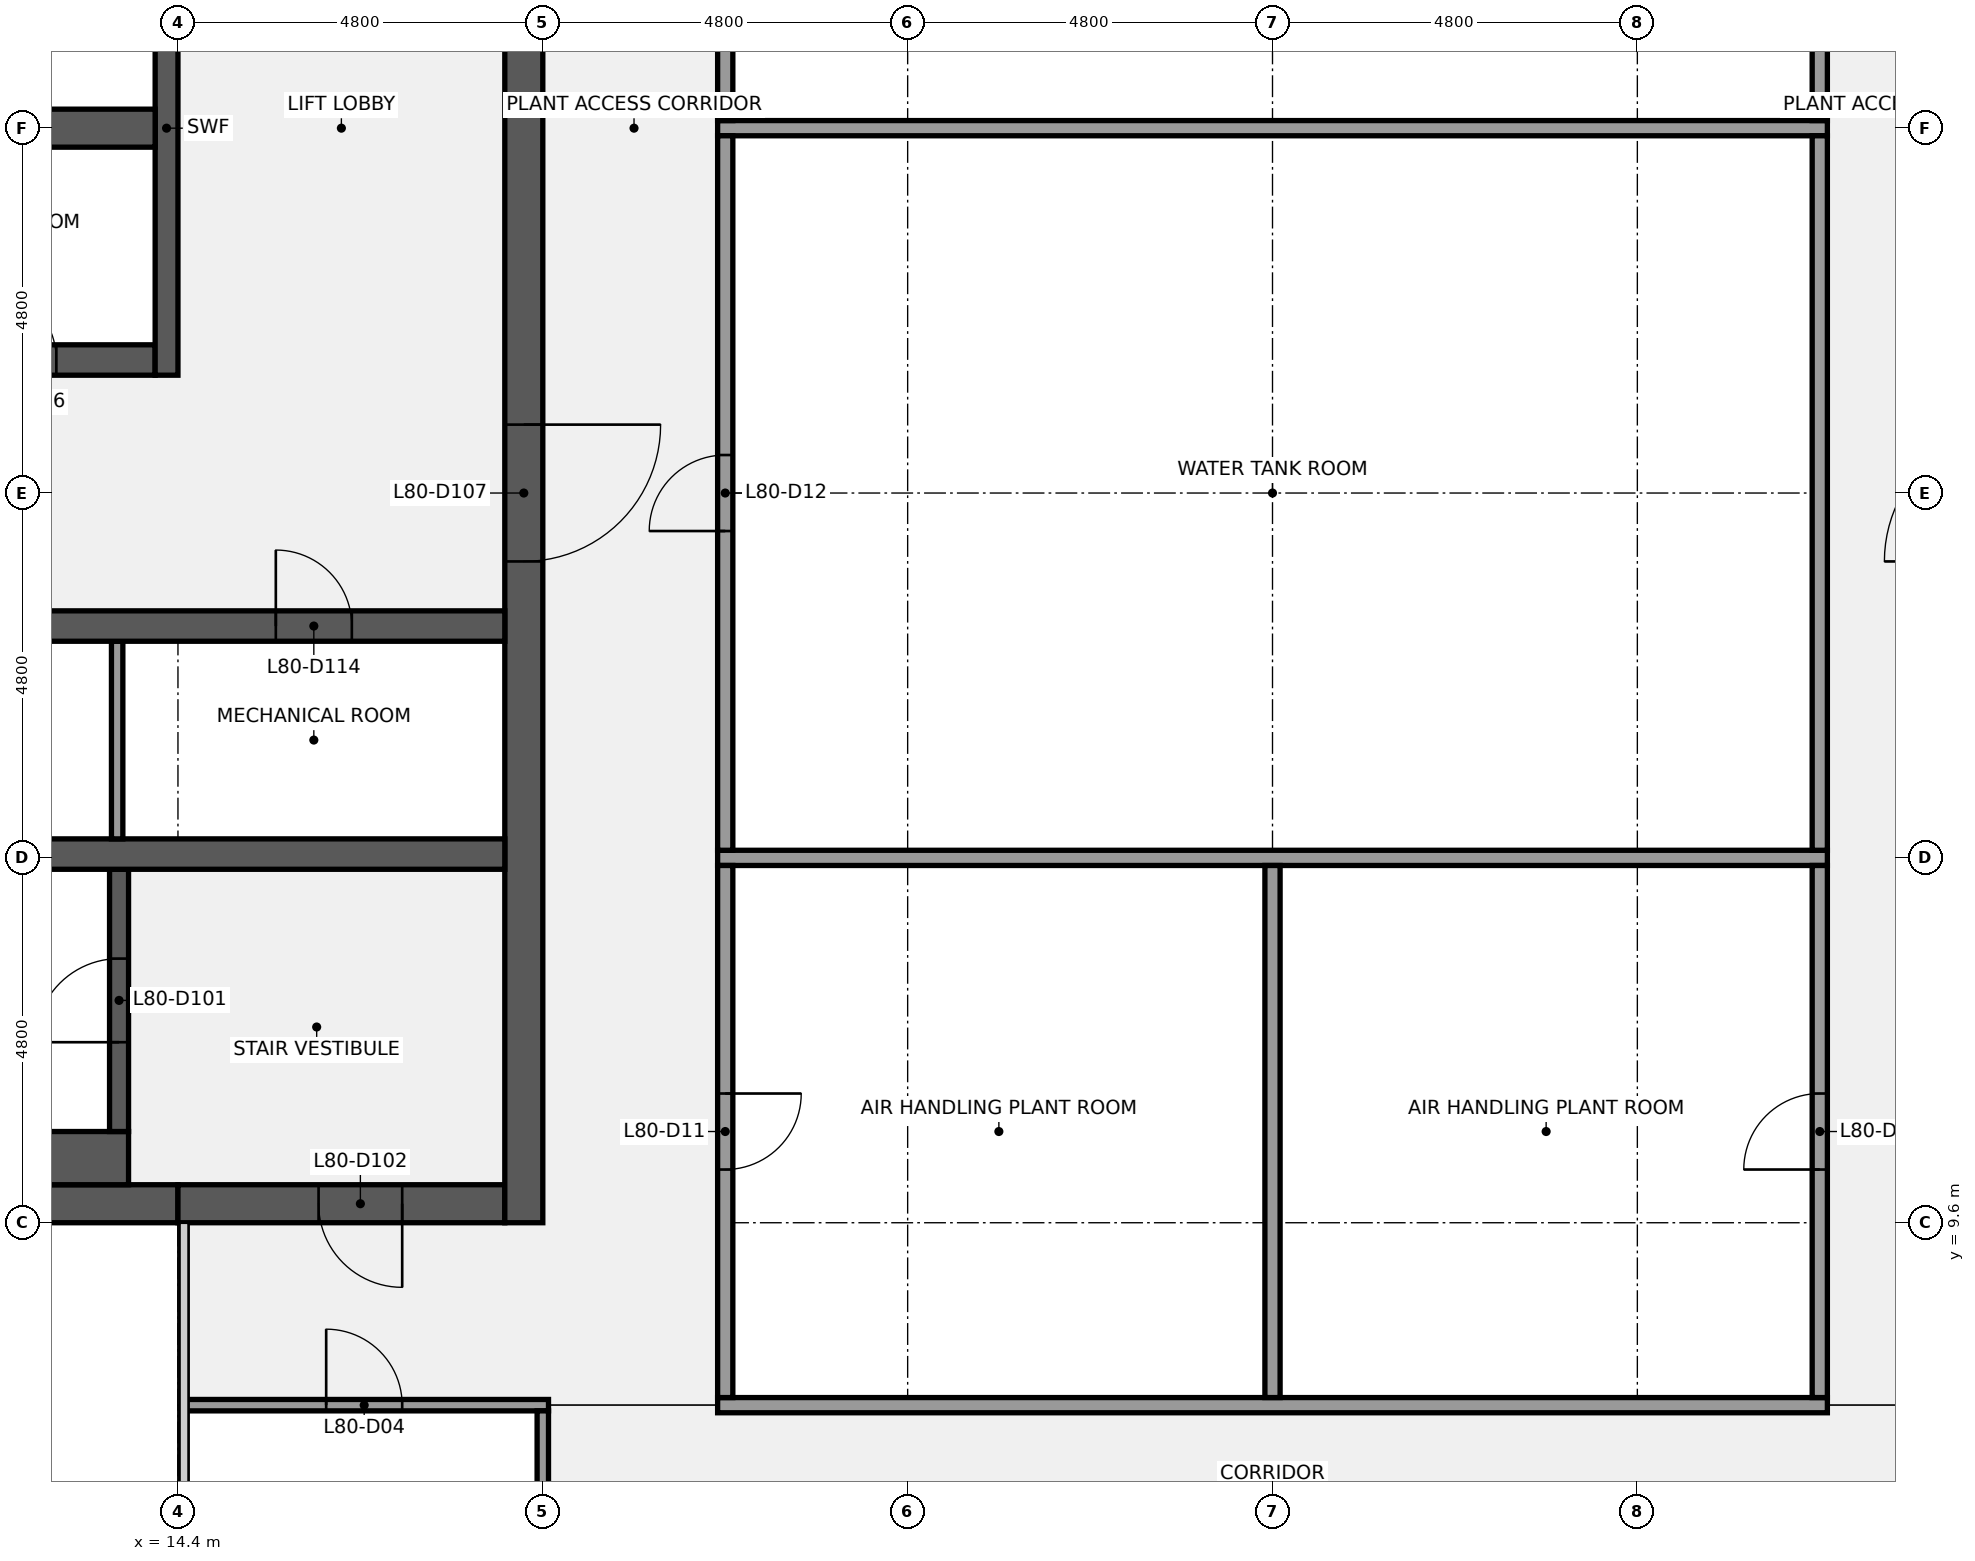
"""IFC4 building model, lengths in metres.
Left out: names, types, materials, properties, quantities, classifications, styles, units other than length and angle.
Written with IfcOpenShell. Run it as: python <this file> out.ifc"""

import sys

from ifc_helpers import new_model, si_unit, direction, frame, frame_2d, origin, place, context, subcontext, project, spatial, rectangle, extrude, element, fill, save


model = new_model("IFC4")
c1 = context("Model", 3, precision=1e-05, world=origin(), true_north=direction((0.0, 1.0)))
c2 = subcontext(c1, "Body", "Model", "MODEL_VIEW")
j1 = project(units=[si_unit("LENGTHUNIT", "METRE"), si_unit("PLANEANGLEUNIT", "RADIAN")], contexts=[c1])
p1 = place(None, origin())
s1 = spatial("IfcSite", under=j1, at=p1, CompositionType="ELEMENT")
p2 = place(p1, origin())
s2 = spatial("IfcBuilding", under=s1, at=p2, CompositionType="ELEMENT")
p3 = place(p2, frame((0.0, 0.0, 358.3)))
s3 = spatial("IfcBuildingStorey", under=s2, at=p3, CompositionType="ELEMENT", Elevation=358.3)
p4 = place(p3, frame((14.4, 9.85, 0.0), z_axis=(0.0, 0.0, 1.0), x_axis=(-1.0, 0.0, 0.0)))
e1 = element("IfcWall", 1, at=p4, inside=s3, PredefinedType="SHEAR", context=c2, shape_type="SweptSolid", body=[
    extrude(rectangle(XDim=13.9, YDim=0.5, at=frame_2d((6.95, 0.0))), origin(), (0.0, 0.0, 1.0), 3.75),
])
p5 = place(p3, frame((18.7, 9.85, 0.0), z_axis=(0.0, 0.0, 1.0), x_axis=(-1.0, 0.0, 0.0)))
e2 = element("IfcWall", 2, at=p5, inside=s3, PredefinedType="SHEAR", context=c2, shape_type="SweptSolid", body=[
    extrude(rectangle(XDim=4.3, YDim=0.5, at=frame_2d((2.15, 0.0))), origin(), (0.0, 0.0, 1.0), 3.75),
])
p6 = place(p5, frame((1.35, 0.0, 0.0)))
e3 = element("IfcOpeningElement", 3, at=p6, cuts=e2, PredefinedType="OPENING", context=c2, shape_type="SweptSolid", body=[
    extrude(rectangle(XDim=1.1, YDim=2.1, at=frame_2d((0.55, 1.05))), frame((0.0, 0.26, 0.0), z_axis=(0.0, -1.0, 0.0), x_axis=(1.0, 0.0, 0.0)), (0.0, 0.0, 1.0), 0.52),
])
p7 = place(p3, frame((18.95, 38.4, 0.0), z_axis=(0.0, 0.0, 1.0), x_axis=(0.0, -1.0, 0.0)))
e4 = element("IfcWall", 4, at=p7, inside=s3, PredefinedType="SHEAR", context=c2, shape_type="SweptSolid", body=[
    extrude(rectangle(XDim=28.8, YDim=0.5, at=frame_2d((14.4, 0.0))), origin(), (0.0, 0.0, 1.0), 3.75),
])
p8 = place(p7, frame((18.3, 0.0, 0.0)))
e5 = element("IfcOpeningElement", 5, at=p8, cuts=e4, PredefinedType="OPENING", context=c2, shape_type="SweptSolid", body=[
    extrude(rectangle(XDim=1.8, YDim=2.1, at=frame_2d((0.9, 1.05))), frame((0.0, 0.26, 0.0), z_axis=(0.0, -1.0, 0.0), x_axis=(1.0, 0.0, 0.0)), (0.0, 0.0, 1.0), 0.52),
])
p9 = place(p7, frame((8.7, 0.0, 0.0)))
e6 = element("IfcOpeningElement", 6, at=p9, cuts=e4, PredefinedType="OPENING", context=c2, shape_type="SweptSolid", body=[
    extrude(rectangle(XDim=1.8, YDim=2.1, at=frame_2d((0.9, 1.05))), frame((0.0, 0.26, 0.0), z_axis=(0.0, -1.0, 0.0), x_axis=(1.0, 0.0, 0.0)), (0.0, 0.0, 1.0), 0.52),
])
p10 = place(p3, frame((6.25, 10.45, 0.0), z_axis=(0.0, 0.0, 1.0), x_axis=(1.0, 0.0, 0.0)))
e7 = element("IfcWall", 7, at=p10, inside=s3, PredefinedType="SHEAR", context=c2, shape_type="SweptSolid", body=[
    extrude(rectangle(XDim=7.5, YDim=0.7, at=frame_2d((3.75, 0.0))), origin(), (0.0, 0.0, 1.0), 3.75),
])
p11 = place(p3, frame((13.625, 10.8, 0.0), z_axis=(0.0, 0.0, 1.0), x_axis=(0.0, 1.0, 0.0)))
e8 = element("IfcWall", 8, at=p11, inside=s3, PredefinedType="SHEAR", context=c2, shape_type="SweptSolid", body=[
    extrude(rectangle(XDim=3.45, YDim=0.25, at=frame_2d((1.725, 0.0))), origin(), (0.0, 0.0, 1.0), 3.75),
])
p12 = place(p11, frame((1.175, 0.0, 0.0)))
e9 = element("IfcOpeningElement", 9, at=p12, cuts=e8, PredefinedType="OPENING", context=c2, shape_type="SweptSolid", body=[
    extrude(rectangle(XDim=1.1, YDim=2.1, at=frame_2d((0.55, 1.05))), frame((0.0, 0.135, 0.0), z_axis=(0.0, -1.0, 0.0), x_axis=(1.0, 0.0, 0.0)), (0.0, 0.0, 1.0), 0.27),
])
p13 = place(p3, frame((0.5, 14.45, 0.0), z_axis=(0.0, 0.0, 1.0), x_axis=(1.0, 0.0, 0.0)))
e10 = element("IfcWall", 10, at=p13, inside=s3, PredefinedType="SHEAR", context=c2, shape_type="SweptSolid", body=[
    extrude(rectangle(XDim=18.2, YDim=0.4, at=frame_2d((9.1, 0.0))), origin(), (0.0, 0.0, 1.0), 3.75),
])
p14 = place(p3, frame((13.6, 14.65, 0.0), z_axis=(0.0, 0.0, 1.0), x_axis=(0.0, 1.0, 0.0)))
e11 = element("IfcWall", 11, at=p14, inside=s3, PredefinedType="PARTITIONING", context=c2, shape_type="SweptSolid", body=[
    extrude(rectangle(XDim=2.6, YDim=0.15, at=frame_2d((1.3, 0.0))), origin(), (0.0, 0.0, 1.0), 3.75),
])
p15 = place(p3, frame((0.5, 17.45, 0.0), z_axis=(0.0, 0.0, 1.0), x_axis=(1.0, 0.0, 0.0)))
e12 = element("IfcWall", 12, at=p15, inside=s3, PredefinedType="SHEAR", context=c2, shape_type="SweptSolid", body=[
    extrude(rectangle(XDim=18.2, YDim=0.4, at=frame_2d((9.1, 0.0))), origin(), (0.0, 0.0, 1.0), 3.75),
])
p16 = place(p15, frame((3.613, 0.0, 0.0)))
e13 = element("IfcOpeningElement", 13, at=p16, cuts=e12, PredefinedType="OPENING", context=c2, shape_type="SweptSolid", body=[
    extrude(rectangle(XDim=1.0, YDim=2.1, at=frame_2d((0.5, 1.05))), frame((0.0, 0.21, 0.0), z_axis=(0.0, -1.0, 0.0), x_axis=(1.0, 0.0, 0.0)), (0.0, 0.0, 1.0), 0.42),
])
p17 = place(p15, frame((10.2, 0.0, 0.0)))
e14 = element("IfcOpeningElement", 14, at=p17, cuts=e12, PredefinedType="OPENING", context=c2, shape_type="SweptSolid", body=[
    extrude(rectangle(XDim=1.0, YDim=2.1, at=frame_2d((0.5, 1.05))), frame((0.0, 0.21, 0.0), z_axis=(0.0, -1.0, 0.0), x_axis=(1.0, 0.0, 0.0)), (0.0, 0.0, 1.0), 0.42),
])
p18 = place(p15, frame((15.188, 0.0, 0.0)))
e15 = element("IfcOpeningElement", 15, at=p18, cuts=e12, PredefinedType="OPENING", context=c2, shape_type="SweptSolid", body=[
    extrude(rectangle(XDim=1.0, YDim=2.1, at=frame_2d((0.5, 1.05))), frame((0.0, 0.21, 0.0), z_axis=(0.0, -1.0, 0.0), x_axis=(1.0, 0.0, 0.0)), (0.0, 0.0, 1.0), 0.42),
])
p19 = place(p3, frame((0.5, 20.95, 0.0), z_axis=(0.0, 0.0, 1.0), x_axis=(1.0, 0.0, 0.0)))
e16 = element("IfcWall", 16, at=p19, inside=s3, PredefinedType="SHEAR", context=c2, shape_type="SweptSolid", body=[
    extrude(rectangle(XDim=13.6, YDim=0.4, at=frame_2d((6.8, 0.0))), origin(), (0.0, 0.0, 1.0), 3.75),
])
p20 = place(p19, frame((6.35, 0.0, 0.0)))
e17 = element("IfcOpeningElement", 17, at=p20, cuts=e16, PredefinedType="OPENING", context=c2, shape_type="SweptSolid", body=[
    extrude(rectangle(XDim=1.1, YDim=2.1, at=frame_2d((0.55, 1.05))), frame((0.0, 0.21, 0.0), z_axis=(0.0, -1.0, 0.0), x_axis=(1.0, 0.0, 0.0)), (0.0, 0.0, 1.0), 0.42),
])
p21 = place(p19, frame((11.3, 0.0, 0.0)))
e18 = element("IfcOpeningElement", 18, at=p21, cuts=e16, PredefinedType="OPENING", context=c2, shape_type="SweptSolid", body=[
    extrude(rectangle(XDim=1.0, YDim=2.1, at=frame_2d((0.5, 1.05))), frame((0.0, 0.21, 0.0), z_axis=(0.0, -1.0, 0.0), x_axis=(1.0, 0.0, 0.0)), (0.0, 0.0, 1.0), 0.42),
])
p22 = place(p3, frame((14.25, 20.75, 0.0), z_axis=(0.0, 0.0, 1.0), x_axis=(0.0, 1.0, 0.0)))
e19 = element("IfcWall", 19, at=p22, inside=s3, PredefinedType="SHEAR", context=c2, shape_type="SweptSolid", body=[
    extrude(rectangle(XDim=6.5, YDim=0.3, at=frame_2d((3.25, 0.0))), origin(), (0.0, 0.0, 1.0), 3.75),
])
p23 = place(p3, frame((0.5, 24.0, 0.0), z_axis=(0.0, 0.0, 1.0), x_axis=(1.0, 0.0, 0.0)))
e20 = element("IfcWall", 20, at=p23, inside=s3, PredefinedType="SHEAR", context=c2, shape_type="SweptSolid", body=[
    extrude(rectangle(XDim=13.6, YDim=0.5, at=frame_2d((6.8, 0.0))), origin(), (0.0, 0.0, 1.0), 3.75),
])
p24 = place(p3, frame((14.5, 7.2, 0.0), z_axis=(0.0, 0.0, 1.0), x_axis=(1.0, 0.0, 0.0)))
e21 = element("IfcWall", 21, at=p24, inside=s3, PredefinedType="PARTITIONING", context=c2, shape_type="SweptSolid", body=[
    extrude(rectangle(XDim=4.775, YDim=0.15, at=frame_2d((2.387, 0.0))), origin(), (0.0, 0.0, 1.0), 2.759),
])
p25 = place(p24, frame((1.85, 0.0, 0.0)))
e22 = element("IfcOpeningElement", 22, at=p25, cuts=e21, PredefinedType="OPENING", context=c2, shape_type="SweptSolid", body=[
    extrude(rectangle(XDim=1.0, YDim=2.1, at=frame_2d((0.5, 1.05))), frame((0.0, 0.085, 0.0), z_axis=(0.0, -1.0, 0.0), x_axis=(1.0, 0.0, 0.0)), (0.0, 0.0, 1.0), 0.17),
])
for number, where, z_axis, x_axis in (
    (23, (21.5, 7.2, 0.0), (0.0, 0.0, 1.0), (1.0, 0.0, 0.0)),
    (24, (21.5, 14.4, 0.0), (0.0, 0.0, 1.0), (1.0, 0.0, 0.0)),
    (25, (21.5, 24.0, 0.0), (0.0, 0.0, 1.0), (1.0, 0.0, 0.0)),
):
    element("IfcWall", number, at=place(p3, frame(where, z_axis=z_axis, x_axis=x_axis)), inside=s3, PredefinedType="PARTITIONING", context=c2, shape_type="SweptSolid", body=[
        extrude(rectangle(XDim=14.6, YDim=0.2, at=frame_2d((7.3, 0.0))), origin(), (0.0, 0.0, 1.0), 2.759),
    ])
p26 = place(p3, frame((19.2, 4.9, 0.0), z_axis=(0.0, 0.0, 1.0), x_axis=(0.0, 1.0, 0.0)))
e26 = element("IfcWall", 26, at=p26, inside=s3, PredefinedType="PARTITIONING", context=c2, shape_type="SweptSolid", body=[
    extrude(rectangle(XDim=2.225, YDim=0.15, at=frame_2d((1.113, 0.0))), origin(), (0.0, 0.0, 1.0), 2.759),
])
p27 = place(p3, frame((21.6, 7.3, 0.0), z_axis=(0.0, 0.0, 1.0), x_axis=(0.0, 1.0, 0.0)))
e27 = element("IfcWall", 27, at=p27, inside=s3, PredefinedType="PARTITIONING", context=c2, shape_type="SweptSolid", body=[
    extrude(rectangle(XDim=7.0, YDim=0.2, at=frame_2d((3.5, 0.0))), origin(), (0.0, 0.0, 1.0), 2.759),
])
p28 = place(p27, frame((3.0, 0.0, 0.0)))
e28 = element("IfcOpeningElement", 28, at=p28, cuts=e27, PredefinedType="OPENING", context=c2, shape_type="SweptSolid", body=[
    extrude(rectangle(XDim=1.0, YDim=2.1, at=frame_2d((0.5, 1.05))), frame((0.0, 0.11, 0.0), z_axis=(0.0, -1.0, 0.0), x_axis=(1.0, 0.0, 0.0)), (0.0, 0.0, 1.0), 0.22),
])
p29 = place(p3, frame((21.6, 14.5, 0.0), z_axis=(0.0, 0.0, 1.0), x_axis=(0.0, 1.0, 0.0)))
e29 = element("IfcWall", 29, at=p29, inside=s3, PredefinedType="PARTITIONING", context=c2, shape_type="SweptSolid", body=[
    extrude(rectangle(XDim=9.4, YDim=0.2, at=frame_2d((4.7, 0.0))), origin(), (0.0, 0.0, 1.0), 2.759),
])
p30 = place(p29, frame((4.2, 0.0, 0.0)))
e30 = element("IfcOpeningElement", 30, at=p30, cuts=e29, PredefinedType="OPENING", context=c2, shape_type="SweptSolid", body=[
    extrude(rectangle(XDim=1.0, YDim=2.1, at=frame_2d((0.5, 1.05))), frame((0.0, 0.11, 0.0), z_axis=(0.0, -1.0, 0.0), x_axis=(1.0, 0.0, 0.0)), (0.0, 0.0, 1.0), 0.22),
])
p31 = place(p3, frame((21.6, 24.1, 0.0), z_axis=(0.0, 0.0, 1.0), x_axis=(0.0, 1.0, 0.0)))
e31 = element("IfcWall", 31, at=p31, inside=s3, PredefinedType="PARTITIONING", context=c2, shape_type="SweptSolid", body=[
    extrude(rectangle(XDim=16.6, YDim=0.2, at=frame_2d((8.3, 0.0))), origin(), (0.0, 0.0, 1.0), 2.759),
])
p32 = place(p31, frame((7.8, 0.0, 0.0)))
e32 = element("IfcOpeningElement", 32, at=p32, cuts=e31, PredefinedType="OPENING", context=c2, shape_type="SweptSolid", body=[
    extrude(rectangle(XDim=1.0, YDim=2.1, at=frame_2d((0.5, 1.05))), frame((0.0, 0.11, 0.0), z_axis=(0.0, -1.0, 0.0), x_axis=(1.0, 0.0, 0.0)), (0.0, 0.0, 1.0), 0.22),
])
p33 = place(p3, frame((28.8, 7.3, 0.0), z_axis=(0.0, 0.0, 1.0), x_axis=(0.0, 1.0, 0.0)))
e33 = element("IfcWall", 33, at=p33, inside=s3, PredefinedType="PARTITIONING", context=c2, shape_type="SweptSolid", body=[
    extrude(rectangle(XDim=7.0, YDim=0.2, at=frame_2d((3.5, 0.0))), origin(), (0.0, 0.0, 1.0), 2.759),
])
p34 = place(p3, frame((36.0, 7.3, 0.0), z_axis=(0.0, 0.0, 1.0), x_axis=(0.0, 1.0, 0.0)))
e34 = element("IfcWall", 34, at=p34, inside=s3, PredefinedType="PARTITIONING", context=c2, shape_type="SweptSolid", body=[
    extrude(rectangle(XDim=7.0, YDim=0.2, at=frame_2d((3.5, 0.0))), origin(), (0.0, 0.0, 1.0), 2.759),
])
p35 = place(p34, frame((3.0, 0.0, 0.0)))
e35 = element("IfcOpeningElement", 35, at=p35, cuts=e34, PredefinedType="OPENING", context=c2, shape_type="SweptSolid", body=[
    extrude(rectangle(XDim=1.0, YDim=2.1, at=frame_2d((0.5, 1.05))), frame((0.0, 0.11, 0.0), z_axis=(0.0, -1.0, 0.0), x_axis=(1.0, 0.0, 0.0)), (0.0, 0.0, 1.0), 0.22),
])
p36 = place(p3, frame((36.0, 14.5, 0.0), z_axis=(0.0, 0.0, 1.0), x_axis=(0.0, 1.0, 0.0)))
e36 = element("IfcWall", 36, at=p36, inside=s3, PredefinedType="PARTITIONING", context=c2, shape_type="SweptSolid", body=[
    extrude(rectangle(XDim=9.4, YDim=0.2, at=frame_2d((4.7, 0.0))), origin(), (0.0, 0.0, 1.0), 2.759),
])
p37 = place(p3, frame((36.0, 24.1, 0.0), z_axis=(0.0, 0.0, 1.0), x_axis=(0.0, 1.0, 0.0)))
e37 = element("IfcWall", 37, at=p37, inside=s3, PredefinedType="PARTITIONING", context=c2, shape_type="SweptSolid", body=[
    extrude(rectangle(XDim=16.6, YDim=0.2, at=frame_2d((8.3, 0.0))), origin(), (0.0, 0.0, 1.0), 2.759),
])
p38 = place(p12, origin())
e38 = element("IfcDoor", 38, at=p38, inside=s3, OperationType="SINGLE_SWING_LEFT", PredefinedType="DOOR", context=c2, shape_type="SweptSolid", body=[
    extrude(rectangle(XDim=1.1, YDim=2.1, at=frame_2d((0.55, 1.05))), frame((0.0, 0.025, 0.0), z_axis=(0.0, -1.0, 0.0), x_axis=(1.0, 0.0, 0.0)), (0.0, 0.0, 1.0), 0.05),
])
fill(e9, e38)
p39 = place(p6, origin())
e39 = element("IfcDoor", 39, at=p39, inside=s3, OperationType="SINGLE_SWING_LEFT", PredefinedType="DOOR", context=c2, shape_type="SweptSolid", body=[
    extrude(rectangle(XDim=1.1, YDim=2.1, at=frame_2d((0.55, 1.05))), frame((0.0, 0.025, 0.0), z_axis=(0.0, -1.0, 0.0), x_axis=(1.0, 0.0, 0.0)), (0.0, 0.0, 1.0), 0.05),
])
fill(e3, e39)
p40 = place(p21, origin())
e40 = element("IfcDoor", 40, at=p40, inside=s3, OperationType="SINGLE_SWING_LEFT", PredefinedType="DOOR", context=c2, shape_type="SweptSolid", body=[
    extrude(rectangle(XDim=1.0, YDim=2.1, at=frame_2d((0.5, 1.05))), frame((0.0, 0.025, 0.0), z_axis=(0.0, -1.0, 0.0), x_axis=(1.0, 0.0, 0.0)), (0.0, 0.0, 1.0), 0.05),
])
fill(e18, e40)
p41 = place(p8, origin())
e41 = element("IfcDoor", 41, at=p41, inside=s3, OperationType="DOUBLE_DOOR_SINGLE_SWING", PredefinedType="DOOR", context=c2, shape_type="SweptSolid", body=[
    extrude(rectangle(XDim=1.8, YDim=2.1, at=frame_2d((0.9, 1.05))), frame((0.0, 0.025, 0.0), z_axis=(0.0, -1.0, 0.0), x_axis=(1.0, 0.0, 0.0)), (0.0, 0.0, 1.0), 0.05),
])
fill(e5, e41)
p42 = place(p18, origin())
e42 = element("IfcDoor", 42, at=p42, inside=s3, OperationType="SINGLE_SWING_LEFT", PredefinedType="DOOR", context=c2, shape_type="SweptSolid", body=[
    extrude(rectangle(XDim=1.0, YDim=2.1, at=frame_2d((0.5, 1.05))), frame((0.0, 0.025, 0.0), z_axis=(0.0, -1.0, 0.0), x_axis=(1.0, 0.0, 0.0)), (0.0, 0.0, 1.0), 0.05),
])
fill(e15, e42)
p43 = place(p25, origin())
e43 = element("IfcDoor", 43, at=p43, inside=s3, OperationType="SINGLE_SWING_LEFT", PredefinedType="DOOR", context=c2, shape_type="SweptSolid", body=[
    extrude(rectangle(XDim=1.0, YDim=2.1, at=frame_2d((0.5, 1.05))), frame((0.0, 0.025, 0.0), z_axis=(0.0, -1.0, 0.0), x_axis=(1.0, 0.0, 0.0)), (0.0, 0.0, 1.0), 0.05),
])
fill(e22, e43)
p44 = place(p28, origin())
e44 = element("IfcDoor", 44, at=p44, inside=s3, OperationType="SINGLE_SWING_RIGHT", PredefinedType="DOOR", context=c2, shape_type="SweptSolid", body=[
    extrude(rectangle(XDim=1.0, YDim=2.1, at=frame_2d((0.5, 1.05))), frame((0.0, 0.025, 0.0), z_axis=(0.0, -1.0, 0.0), x_axis=(1.0, 0.0, 0.0)), (0.0, 0.0, 1.0), 0.05),
])
fill(e28, e44)
p45 = place(p30, origin())
e45 = element("IfcDoor", 45, at=p45, inside=s3, OperationType="SINGLE_SWING_LEFT", PredefinedType="DOOR", context=c2, shape_type="SweptSolid", body=[
    extrude(rectangle(XDim=1.0, YDim=2.1, at=frame_2d((0.5, 1.05))), frame((0.0, 0.025, 0.0), z_axis=(0.0, -1.0, 0.0), x_axis=(1.0, 0.0, 0.0)), (0.0, 0.0, 1.0), 0.05),
])
fill(e30, e45)
p46 = place(p35, origin())
e46 = element("IfcDoor", 46, at=p46, inside=s3, OperationType="SINGLE_SWING_LEFT", PredefinedType="DOOR", context=c2, shape_type="SweptSolid", body=[
    extrude(rectangle(XDim=1.0, YDim=2.1, at=frame_2d((0.5, 1.05))), frame((0.0, 0.025, 0.0), z_axis=(0.0, -1.0, 0.0), x_axis=(1.0, 0.0, 0.0)), (0.0, 0.0, 1.0), 0.05),
])
fill(e35, e46)
save(model, sys.argv[1])
